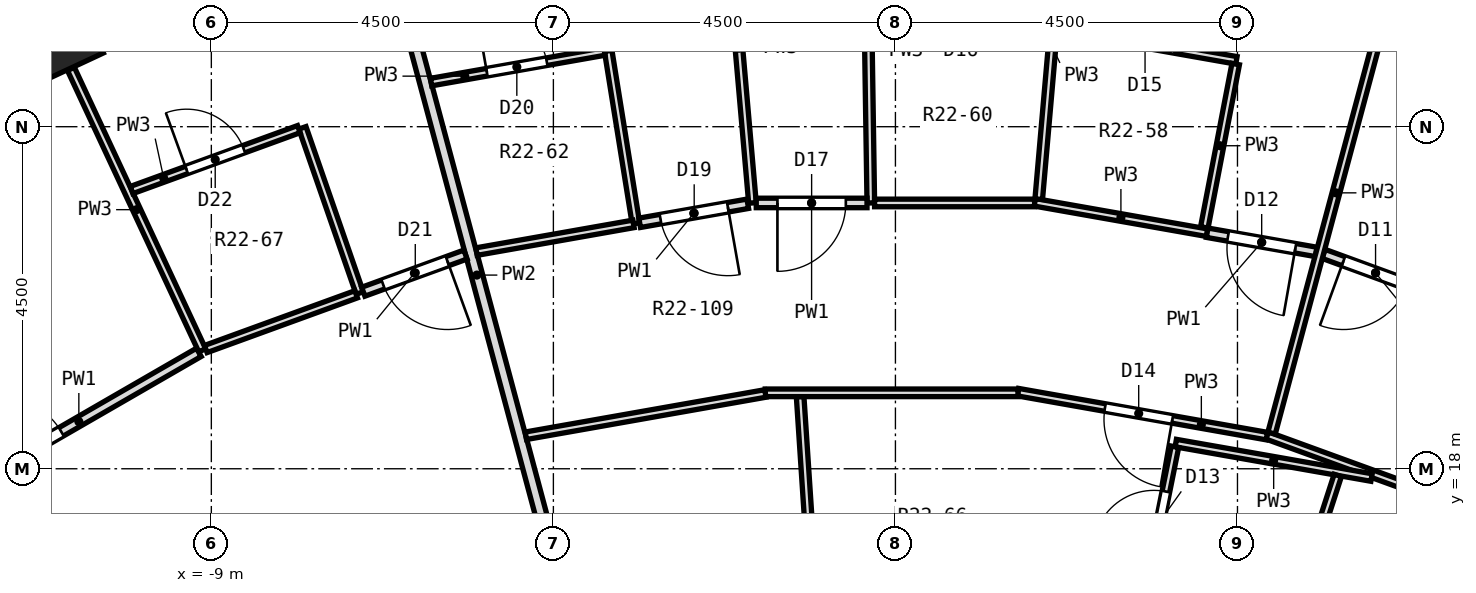
"""IFC4 building model, lengths in metres.
Left out: names, types, materials, properties, quantities, classifications, styles, units other than length and angle.
Written with IfcOpenShell. Run it as: python <this file> out.ifc"""

import sys

from ifc_helpers import new_model, si_unit, direction, frame, frame_2d, origin, origin_2d, place, context, subcontext, project, spatial, rectangle, extrude, element, fill, save


model = new_model("IFC4")
c1 = context("Model", 3, precision=1e-05, world=origin(), true_north=direction((0.0, 1.0)))
c2 = subcontext(c1, "Body", "Model", "MODEL_VIEW")
j1 = project(units=[si_unit("LENGTHUNIT", "METRE"), si_unit("PLANEANGLEUNIT", "RADIAN")], contexts=[c1])
p1 = place(None, origin())
s1 = spatial("IfcSite", under=j1, at=p1, CompositionType="ELEMENT")
p2 = place(p1, origin())
s2 = spatial("IfcBuilding", under=s1, at=p2, CompositionType="ELEMENT")
p3 = place(p2, frame((0.0, 0.0, 141.4)))
s3 = spatial("IfcBuildingStorey", under=s2, at=p3, CompositionType="ELEMENT", Elevation=141.4)
p4 = place(p3, frame((-11.052, 23.7, 0.0), z_axis=(0.0, 0.0, 1.0), x_axis=(-0.422618261741, 0.906307787037, 0.0)))
e1 = element("IfcColumn", 1, at=p4, inside=s3, PredefinedType="COLUMN", context=c2, shape_type="SweptSolid", body=[
    extrude(rectangle(XDim=0.95, YDim=0.95, at=origin_2d()), origin(), (0.0, 0.0, 1.0), 3.3),
])
p5 = place(p3, frame((-0.359, 23.797, 0.0), z_axis=(0.0, 0.0, 1.0), x_axis=(0.015177107463, -0.999884821071, 0.0)))
e2 = element("IfcWall", 2, at=p5, inside=s3, PredefinedType="PARTITIONING", context=c2, shape_type="SweptSolid", body=[
    extrude(rectangle(XDim=2.3, YDim=0.1, at=frame_2d((1.15, 0.0))), origin(), (0.0, 0.0, 1.0), 2.8),
])
p6 = place(p3, frame((-1.254, 18.949, 0.0), z_axis=(0.0, 0.0, 1.0), x_axis=(0.066059696755, -0.997815672589, 0.0)))
e3 = element("IfcWall", 3, at=p6, inside=s3, PredefinedType="PARTITIONING", context=c2, shape_type="SweptSolid", body=[
    extrude(rectangle(XDim=7.303, YDim=0.1, at=frame_2d((3.651, 0.0))), origin(), (0.0, 0.0, 1.0), 2.8),
])
p7 = place(p6, frame((3.208, 0.0, 0.0)))
e4 = element("IfcOpeningElement", 4, at=p7, cuts=e3, PredefinedType="OPENING", context=c2, shape_type="SweptSolid", body=[
    extrude(rectangle(XDim=0.9, YDim=2.1, at=frame_2d((0.45, 1.05))), frame((0.0, 0.062, 0.0), z_axis=(0.0, -1.0, 0.0), x_axis=(1.0, 0.0, 0.0)), (0.0, 0.0, 1.0), 0.124),
])
p8 = place(p3, frame((-2.237, 25.567, 0.0), z_axis=(0.0, 0.0, 1.0), x_axis=(0.087119511186, -0.996197867279, 0.0)))
e5 = element("IfcWall", 5, at=p8, inside=s3, PredefinedType="PARTITIONING", context=c2, shape_type="SweptSolid", body=[
    extrude(rectangle(XDim=4.086, YDim=0.1, at=frame_2d((2.043, 0.0))), origin(), (0.0, 0.0, 1.0), 2.8),
])
p9 = place(p3, frame((-3.779, 23.498, 0.0), z_axis=(0.0, 0.0, 1.0), x_axis=(0.15868179071, -0.987329777378, 0.0)))
e6 = element("IfcWall", 6, at=p9, inside=s3, PredefinedType="PARTITIONING", context=c2, shape_type="SweptSolid", body=[
    extrude(rectangle(XDim=2.3, YDim=0.1, at=frame_2d((1.15, 0.0))), origin(), (0.0, 0.0, 1.0), 2.8),
])
p10 = place(p3, frame((-6.643, 24.791, 0.0), z_axis=(0.0, 0.0, 1.0), x_axis=(0.258629569049, -0.965976576328, 0.0)))
e7 = element("IfcWall", 7, at=p10, inside=s3, PredefinedType="PARTITIONING", context=c2, shape_type="SweptSolid", body=[
    extrude(rectangle(XDim=8.784, YDim=0.15, at=frame_2d((4.392, 0.0))), origin(), (0.0, 0.0, 1.0), 2.8),
])
p11 = place(p3, frame((-7.802, 22.485, 0.0), z_axis=(0.0, 0.0, 1.0), x_axis=(0.327763034971, -0.944759965762, 0.0)))
e8 = element("IfcWall", 8, at=p11, inside=s3, PredefinedType="PARTITIONING", context=c2, shape_type="SweptSolid", body=[
    extrude(rectangle(XDim=2.3, YDim=0.1, at=frame_2d((1.15, 0.0))), origin(), (0.0, 0.0, 1.0), 2.8),
])
p12 = place(p3, frame((-10.847, 23.26, 0.0), z_axis=(0.0, 0.0, 1.0), x_axis=(0.422784035137, -0.906230467173, 0.0)))
e9 = element("IfcWall", 9, at=p12, inside=s3, PredefinedType="PARTITIONING", context=c2, shape_type="SweptSolid", body=[
    extrude(rectangle(XDim=4.085, YDim=0.1, at=frame_2d((2.042, 0.0))), origin(), (0.0, 0.0, 1.0), 2.8),
])
p13 = place(p3, frame((5.633, 20.827, 0.0), z_axis=(0.0, 0.0, 1.0), x_axis=(0.939292989356, -0.343116132159, 0.0)))
e10 = element("IfcWall", 10, at=p13, inside=s3, PredefinedType="PARTITIONING", context=c2, shape_type="SweptSolid", body=[
    extrude(rectangle(XDim=1.456, YDim=0.125, at=frame_2d((0.728, 0.0))), origin(), (0.0, 0.0, 1.0), 2.8),
])
p14 = place(p13, frame((0.278, 0.0, 0.0)))
e11 = element("IfcOpeningElement", 11, at=p14, cuts=e10, PredefinedType="OPENING", context=c2, shape_type="SweptSolid", body=[
    extrude(rectangle(XDim=0.9, YDim=2.1, at=frame_2d((0.45, 1.05))), frame((0.0, 0.074, 0.0), z_axis=(0.0, -1.0, 0.0), x_axis=(1.0, 0.0, 0.0)), (0.0, 0.0, 1.0), 0.149),
])
p15 = place(p3, frame((4.888, 18.438, 0.0), z_axis=(0.0, 0.0, 1.0), x_axis=(0.939679760884, -0.342055473549, 0.0)))
e12 = element("IfcWall", 12, at=p15, inside=s3, PredefinedType="PARTITIONING", context=c2, shape_type="SweptSolid", body=[
    extrude(rectangle(XDim=3.325, YDim=0.1, at=frame_2d((1.663, 0.0))), origin(), (0.0, 0.0, 1.0), 2.8),
])
p16 = place(p3, frame((3.688, 18.338, 0.0), z_axis=(0.0, 0.0, 1.0), x_axis=(0.984859586639, -0.173353957572, 0.0)))
e13 = element("IfcWall", 13, at=p16, inside=s3, PredefinedType="PARTITIONING", context=c2, shape_type="SweptSolid", body=[
    extrude(rectangle(XDim=2.615, YDim=0.1, at=frame_2d((1.308, 0.0))), origin(), (0.0, 0.0, 1.0), 2.8),
])
p17 = place(p3, frame((1.612, 19.008, 0.0), z_axis=(0.0, 0.0, 1.0), x_axis=(0.984770991222, -0.173856535243, 0.0)))
e14 = element("IfcWall", 14, at=p17, inside=s3, PredefinedType="PARTITIONING", context=c2, shape_type="SweptSolid", body=[
    extrude(rectangle(XDim=3.325, YDim=0.1, at=frame_2d((1.663, 0.0))), origin(), (0.0, 0.0, 1.0), 2.8),
])
p18 = place(p17, frame((1.163, 0.0, 0.0)))
e15 = element("IfcOpeningElement", 15, at=p18, cuts=e14, PredefinedType="OPENING", context=c2, shape_type="SweptSolid", body=[
    extrude(rectangle(XDim=0.9, YDim=2.1, at=frame_2d((0.45, 1.05))), frame((0.0, 0.062, 0.0), z_axis=(0.0, -1.0, 0.0), x_axis=(1.0, 0.0, 0.0)), (0.0, 0.0, 1.0), 0.124),
])
p19 = place(p3, frame((1.831, 21.506, 0.0), z_axis=(0.0, 0.0, 1.0), x_axis=(0.984783558818, -0.173785333909, 0.0)))
e16 = element("IfcWall", 16, at=p19, inside=s3, PredefinedType="PARTITIONING", context=c2, shape_type="SweptSolid", body=[
    extrude(rectangle(XDim=2.305, YDim=0.1, at=frame_2d((1.153, 0.0))), origin(), (0.0, 0.0, 1.0), 2.8),
])
p20 = place(p3, frame((4.101, 21.105, 0.0), z_axis=(0.0, 0.0, 1.0), x_axis=(0.984862774054, -0.173335848233, 0.0)))
e17 = element("IfcWall", 17, at=p20, inside=s3, PredefinedType="PARTITIONING", context=c2, shape_type="SweptSolid", body=[
    extrude(rectangle(XDim=1.456, YDim=0.125, at=frame_2d((0.728, 0.0))), origin(), (0.0, 0.0, 1.0), 2.8),
])
p21 = place(p20, frame((0.278, 0.0, 0.0)))
e18 = element("IfcOpeningElement", 18, at=p21, cuts=e17, PredefinedType="OPENING", context=c2, shape_type="SweptSolid", body=[
    extrude(rectangle(XDim=0.9, YDim=2.1, at=frame_2d((0.45, 1.05))), frame((0.0, 0.074, 0.0), z_axis=(0.0, -1.0, 0.0), x_axis=(1.0, 0.0, 0.0)), (0.0, 0.0, 1.0), 0.149),
])
p22 = place(p3, frame((2.131, 23.788, 0.0), z_axis=(0.0, 0.0, 1.0), x_axis=(0.984802055472, -0.173680486922, 0.0)))
e19 = element("IfcWall", 19, at=p22, inside=s3, PredefinedType="PARTITIONING", context=c2, shape_type="SweptSolid", body=[
    extrude(rectangle(XDim=2.391, YDim=0.1, at=frame_2d((1.196, 0.0))), origin(), (0.0, 0.0, 1.0), 2.8),
])
p23 = place(p22, frame((0.771, 0.0, 0.0)))
e20 = element("IfcOpeningElement", 20, at=p23, cuts=e19, PredefinedType="OPENING", context=c2, shape_type="SweptSolid", body=[
    extrude(rectangle(XDim=0.8, YDim=2.1, at=frame_2d((0.4, 1.05))), frame((0.0, 0.062, 0.0), z_axis=(0.0, -1.0, 0.0), x_axis=(1.0, 0.0, 0.0)), (0.0, 0.0, 1.0), 0.124),
])
p24 = place(p3, frame((-1.713, 18.999, 0.0), z_axis=(0.0, 0.0, 1.0), x_axis=(1.0, 0.0, 0.0)))
e21 = element("IfcWall", 21, at=p24, inside=s3, PredefinedType="PARTITIONING", context=c2, shape_type="SweptSolid", body=[
    extrude(rectangle(XDim=3.325, YDim=0.1, at=frame_2d((1.663, 0.0))), origin(), (0.0, 0.0, 1.0), 2.8),
])
p25 = place(p3, frame((-0.274, 21.497, 0.0), z_axis=(0.0, 0.0, 1.0), x_axis=(1.0, 0.0, 0.0)))
e22 = element("IfcWall", 22, at=p25, inside=s3, PredefinedType="PARTITIONING", context=c2, shape_type="SweptSolid", body=[
    extrude(rectangle(XDim=2.105, YDim=0.1, at=frame_2d((1.052, 0.0))), origin(), (0.0, 0.0, 1.0), 2.8),
])
p26 = place(p3, frame((-1.831, 21.497, 0.0), z_axis=(0.0, 0.0, 1.0), x_axis=(1.0, 0.0, 0.0)))
e23 = element("IfcWall", 23, at=p26, inside=s3, PredefinedType="PARTITIONING", context=c2, shape_type="SweptSolid", body=[
    extrude(rectangle(XDim=1.457, YDim=0.125, at=frame_2d((0.729, 0.0))), origin(), (0.0, 0.0, 1.0), 2.8),
])
p27 = place(p26, frame((0.279, 0.0, 0.0)))
e24 = element("IfcOpeningElement", 24, at=p27, cuts=e23, PredefinedType="OPENING", context=c2, shape_type="SweptSolid", body=[
    extrude(rectangle(XDim=0.9, YDim=2.1, at=frame_2d((0.45, 1.05))), frame((0.0, 0.074, 0.0), z_axis=(0.0, -1.0, 0.0), x_axis=(1.0, 0.0, 0.0)), (0.0, 0.0, 1.0), 0.149),
])
p28 = place(p3, frame((-4.862, 18.434, 0.0), z_axis=(0.0, 0.0, 1.0), x_axis=(0.984777412926, 0.173820157031, 0.0)))
e25 = element("IfcWall", 25, at=p28, inside=s3, PredefinedType="PARTITIONING", context=c2, shape_type="SweptSolid", body=[
    extrude(rectangle(XDim=3.199, YDim=0.1, at=frame_2d((1.6, 0.0))), origin(), (0.0, 0.0, 1.0), 2.8),
])
p29 = place(p3, frame((-5.511, 20.857, 0.0), z_axis=(0.0, 0.0, 1.0), x_axis=(0.984775352835, 0.173831828066, 0.0)))
e26 = element("IfcWall", 26, at=p29, inside=s3, PredefinedType="PARTITIONING", context=c2, shape_type="SweptSolid", body=[
    extrude(rectangle(XDim=2.097, YDim=0.1, at=frame_2d((1.048, 0.0))), origin(), (0.0, 0.0, 1.0), 2.8),
])
p30 = place(p3, frame((-3.365, 21.236, 0.0), z_axis=(0.0, 0.0, 1.0), x_axis=(0.984839675328, 0.173467039809, 0.0)))
e27 = element("IfcWall", 27, at=p30, inside=s3, PredefinedType="PARTITIONING", context=c2, shape_type="SweptSolid", body=[
    extrude(rectangle(XDim=1.444, YDim=0.125, at=frame_2d((0.722, 0.0))), origin(), (0.0, 0.0, 1.0), 2.8),
])
p31 = place(p30, frame((0.278, 0.0, 0.0)))
e28 = element("IfcOpeningElement", 28, at=p31, cuts=e27, PredefinedType="OPENING", context=c2, shape_type="SweptSolid", body=[
    extrude(rectangle(XDim=0.9, YDim=2.1, at=frame_2d((0.45, 1.05))), frame((0.0, 0.074, 0.0), z_axis=(0.0, -1.0, 0.0), x_axis=(1.0, 0.0, 0.0)), (0.0, 0.0, 1.0), 0.149),
])
p32 = place(p3, frame((-6.109, 23.087, 0.0), z_axis=(0.0, 0.0, 1.0), x_axis=(0.984797350308, 0.173707164006, 0.0)))
e29 = element("IfcWall", 29, at=p32, inside=s3, PredefinedType="PARTITIONING", context=c2, shape_type="SweptSolid", body=[
    extrude(rectangle(XDim=2.316, YDim=0.1, at=frame_2d((1.158, 0.0))), origin(), (0.0, 0.0, 1.0), 2.8),
])
p33 = place(p32, frame((0.746, 0.0, 0.0)))
e30 = element("IfcOpeningElement", 30, at=p33, cuts=e29, PredefinedType="OPENING", context=c2, shape_type="SweptSolid", body=[
    extrude(rectangle(XDim=0.8, YDim=2.1, at=frame_2d((0.4, 1.05))), frame((0.0, 0.062, 0.0), z_axis=(0.0, -1.0, 0.0), x_axis=(1.0, 0.0, 0.0)), (0.0, 0.0, 1.0), 0.124),
])
p34 = place(p3, frame((-9.073, 19.575, 0.0), z_axis=(0.0, 0.0, 1.0), x_axis=(0.939725675468, 0.341929312674, 0.0)))
e31 = element("IfcWall", 31, at=p34, inside=s3, PredefinedType="PARTITIONING", context=c2, shape_type="SweptSolid", body=[
    extrude(rectangle(XDim=2.105, YDim=0.1, at=frame_2d((1.052, 0.0))), origin(), (0.0, 0.0, 1.0), 2.8),
])
p35 = place(p3, frame((-7.001, 20.329, 0.0), z_axis=(0.0, 0.0, 1.0), x_axis=(0.939788441711, 0.341756762663, 0.0)))
e32 = element("IfcWall", 32, at=p35, inside=s3, PredefinedType="PARTITIONING", context=c2, shape_type="SweptSolid", body=[
    extrude(rectangle(XDim=1.431, YDim=0.125, at=frame_2d((0.715, 0.0))), origin(), (0.0, 0.0, 1.0), 2.8),
])
p36 = place(p35, frame((0.278, 0.0, 0.0)))
e33 = element("IfcOpeningElement", 33, at=p36, cuts=e32, PredefinedType="OPENING", context=c2, shape_type="SweptSolid", body=[
    extrude(rectangle(XDim=0.9, YDim=2.1, at=frame_2d((0.45, 1.05))), frame((0.0, 0.074, 0.0), z_axis=(0.0, -1.0, 0.0), x_axis=(1.0, 0.0, 0.0)), (0.0, 0.0, 1.0), 0.149),
])
p37 = place(p3, frame((-10.049, 21.667, 0.0), z_axis=(0.0, 0.0, 1.0), x_axis=(0.939662448837, 0.342103028699, 0.0)))
e34 = element("IfcWall", 34, at=p37, inside=s3, PredefinedType="PARTITIONING", context=c2, shape_type="SweptSolid", body=[
    extrude(rectangle(XDim=2.342, YDim=0.1, at=frame_2d((1.171, 0.0))), origin(), (0.0, 0.0, 1.0), 2.8),
])
p38 = place(p37, frame((0.771, 0.0, 0.0)))
e35 = element("IfcOpeningElement", 35, at=p38, cuts=e34, PredefinedType="OPENING", context=c2, shape_type="SweptSolid", body=[
    extrude(rectangle(XDim=0.8, YDim=2.1, at=frame_2d((0.4, 1.05))), frame((0.0, 0.062, 0.0), z_axis=(0.0, -1.0, 0.0), x_axis=(1.0, 0.0, 0.0)), (0.0, 0.0, 1.0), 0.124),
])
p39 = place(p3, frame((-12.432, 17.645, 0.0), z_axis=(0.0, 0.0, 1.0), x_axis=(0.866012062527, 0.500023107024, 0.0)))
e36 = element("IfcWall", 36, at=p39, inside=s3, PredefinedType="PARTITIONING", context=c2, shape_type="SweptSolid", body=[
    extrude(rectangle(XDim=3.772, YDim=0.125, at=frame_2d((1.886, 0.0))), origin(), (0.0, 0.0, 1.0), 2.8),
])
p40 = place(p39, frame((0.783, 0.0, 0.0)))
e37 = element("IfcOpeningElement", 37, at=p40, cuts=e36, PredefinedType="OPENING", context=c2, shape_type="SweptSolid", body=[
    extrude(rectangle(XDim=0.9, YDim=2.1, at=frame_2d((0.45, 1.05))), frame((0.0, 0.074, 0.0), z_axis=(0.0, -1.0, 0.0), x_axis=(1.0, 0.0, 0.0)), (0.0, 0.0, 1.0), 0.149),
])
p41 = place(p3, frame((5.072, 15.609, 0.0), z_axis=(0.0, 0.0, 1.0), x_axis=(0.30874872516, 0.95114364042, 0.0)))
e38 = element("IfcWall", 38, at=p41, inside=s3, PredefinedType="PARTITIONING", context=c2, shape_type="SweptSolid", body=[
    extrude(rectangle(XDim=2.422, YDim=0.1, at=frame_2d((1.211, 0.0))), origin(), (0.0, 0.0, 1.0), 2.8),
])
p42 = place(p3, frame((4.949, 18.469, 0.0), z_axis=(0.0, 0.0, 1.0), x_axis=(0.258793270627, 0.96593273217, 0.0)))
e39 = element("IfcWall", 39, at=p42, inside=s3, PredefinedType="PARTITIONING", context=c2, shape_type="SweptSolid", body=[
    extrude(rectangle(XDim=6.544, YDim=0.1, at=frame_2d((3.272, 0.0))), origin(), (0.0, 0.0, 1.0), 2.8),
])
p43 = place(p3, frame((3.285, 16.34, 0.0), z_axis=(0.0, 0.0, 1.0), x_axis=(0.197131685641, 0.980377018558, 0.0)))
e40 = element("IfcWall", 40, at=p43, inside=s3, PredefinedType="PARTITIONING", context=c2, shape_type="SweptSolid", body=[
    extrude(rectangle(XDim=1.988, YDim=0.1, at=frame_2d((0.994, 0.0))), origin(), (0.0, 0.0, 1.0), 2.8),
])
p44 = place(p43, frame((0.587, 0.0, 0.0)))
e41 = element("IfcOpeningElement", 41, at=p44, cuts=e40, PredefinedType="OPENING", context=c2, shape_type="SweptSolid", body=[
    extrude(rectangle(XDim=0.8, YDim=2.1, at=frame_2d((0.4, 1.05))), frame((0.0, 0.062, 0.0), z_axis=(0.0, -1.0, 0.0), x_axis=(1.0, 0.0, 0.0)), (0.0, 0.0, 1.0), 0.124),
])
p45 = place(p3, frame((4.064, 21.175, 0.0), z_axis=(0.0, 0.0, 1.0), x_axis=(0.188685986474, 0.982037473067, 0.0)))
e42 = element("IfcWall", 42, at=p45, inside=s3, PredefinedType="PARTITIONING", context=c2, shape_type="SweptSolid", body=[
    extrude(rectangle(XDim=2.188, YDim=0.1, at=frame_2d((1.094, 0.0))), origin(), (0.0, 0.0, 1.0), 2.8),
])
p46 = place(p3, frame((1.885, 21.547, 0.0), z_axis=(0.0, 0.0, 1.0), x_axis=(0.087109918438, 0.996198706137, 0.0)))
e43 = element("IfcWall", 43, at=p46, inside=s3, PredefinedType="PARTITIONING", context=c2, shape_type="SweptSolid", body=[
    extrude(rectangle(XDim=4.036, YDim=0.1, at=frame_2d((2.018, 0.0))), origin(), (0.0, 0.0, 1.0), 2.8),
])
p47 = place(p14, frame((0.9, 0.0, 0.0), z_axis=(0.0, 0.0, 1.0), x_axis=(-1.0, 0.0, 0.0)))
e44 = element("IfcDoor", 44, at=p47, inside=s3, OperationType="SINGLE_SWING_RIGHT", PredefinedType="DOOR", context=c2, shape_type="SweptSolid", body=[
    extrude(rectangle(XDim=0.9, YDim=2.1, at=frame_2d((0.45, 1.05))), frame((0.0, 0.025, 0.0), z_axis=(0.0, -1.0, 0.0), x_axis=(1.0, 0.0, 0.0)), (0.0, 0.0, 1.0), 0.05),
])
fill(e11, e44)
p48 = place(p21, frame((0.9, 0.0, 0.0), z_axis=(0.0, 0.0, 1.0), x_axis=(-1.0, 0.0, 0.0)))
e45 = element("IfcDoor", 45, at=p48, inside=s3, OperationType="SINGLE_SWING_LEFT", PredefinedType="DOOR", context=c2, shape_type="SweptSolid", body=[
    extrude(rectangle(XDim=0.9, YDim=2.1, at=frame_2d((0.45, 1.05))), frame((0.0, 0.025, 0.0), z_axis=(0.0, -1.0, 0.0), x_axis=(1.0, 0.0, 0.0)), (0.0, 0.0, 1.0), 0.05),
])
fill(e18, e45)
p49 = place(p44, origin())
e46 = element("IfcDoor", 46, at=p49, inside=s3, OperationType="SINGLE_SWING_LEFT", PredefinedType="DOOR", context=c2, shape_type="SweptSolid", body=[
    extrude(rectangle(XDim=0.8, YDim=2.1, at=frame_2d((0.4, 1.05))), frame((0.0, 0.025, 0.0), z_axis=(0.0, -1.0, 0.0), x_axis=(1.0, 0.0, 0.0)), (0.0, 0.0, 1.0), 0.05),
])
fill(e41, e46)
p50 = place(p18, frame((0.9, 0.0, 0.0), z_axis=(0.0, 0.0, 1.0), x_axis=(-1.0, 0.0, 0.0)))
e47 = element("IfcDoor", 47, at=p50, inside=s3, OperationType="SINGLE_SWING_LEFT", PredefinedType="DOOR", context=c2, shape_type="SweptSolid", body=[
    extrude(rectangle(XDim=0.9, YDim=2.1, at=frame_2d((0.45, 1.05))), frame((0.0, 0.025, 0.0), z_axis=(0.0, -1.0, 0.0), x_axis=(1.0, 0.0, 0.0)), (0.0, 0.0, 1.0), 0.05),
])
fill(e15, e47)
p51 = place(p27, frame((0.9, 0.0, 0.0), z_axis=(0.0, 0.0, 1.0), x_axis=(-1.0, 0.0, 0.0)))
e48 = element("IfcDoor", 48, at=p51, inside=s3, OperationType="SINGLE_SWING_RIGHT", PredefinedType="DOOR", context=c2, shape_type="SweptSolid", body=[
    extrude(rectangle(XDim=0.9, YDim=2.1, at=frame_2d((0.45, 1.05))), frame((0.0, 0.025, 0.0), z_axis=(0.0, -1.0, 0.0), x_axis=(1.0, 0.0, 0.0)), (0.0, 0.0, 1.0), 0.05),
])
fill(e24, e48)
p52 = place(p31, frame((0.9, 0.0, 0.0), z_axis=(0.0, 0.0, 1.0), x_axis=(-1.0, 0.0, 0.0)))
e49 = element("IfcDoor", 49, at=p52, inside=s3, OperationType="SINGLE_SWING_LEFT", PredefinedType="DOOR", context=c2, shape_type="SweptSolid", body=[
    extrude(rectangle(XDim=0.9, YDim=2.1, at=frame_2d((0.45, 1.05))), frame((0.0, 0.025, 0.0), z_axis=(0.0, -1.0, 0.0), x_axis=(1.0, 0.0, 0.0)), (0.0, 0.0, 1.0), 0.05),
])
fill(e28, e49)
p53 = place(p33, origin())
e50 = element("IfcDoor", 50, at=p53, inside=s3, OperationType="SINGLE_SWING_LEFT", PredefinedType="DOOR", context=c2, shape_type="SweptSolid", body=[
    extrude(rectangle(XDim=0.8, YDim=2.1, at=frame_2d((0.4, 1.05))), frame((0.0, 0.025, 0.0), z_axis=(0.0, -1.0, 0.0), x_axis=(1.0, 0.0, 0.0)), (0.0, 0.0, 1.0), 0.05),
])
fill(e30, e50)
p54 = place(p36, frame((0.9, 0.0, 0.0), z_axis=(0.0, 0.0, 1.0), x_axis=(-1.0, 0.0, 0.0)))
e51 = element("IfcDoor", 51, at=p54, inside=s3, OperationType="SINGLE_SWING_LEFT", PredefinedType="DOOR", context=c2, shape_type="SweptSolid", body=[
    extrude(rectangle(XDim=0.9, YDim=2.1, at=frame_2d((0.45, 1.05))), frame((0.0, 0.025, 0.0), z_axis=(0.0, -1.0, 0.0), x_axis=(1.0, 0.0, 0.0)), (0.0, 0.0, 1.0), 0.05),
])
fill(e33, e51)
p55 = place(p38, origin())
e52 = element("IfcDoor", 52, at=p55, inside=s3, OperationType="SINGLE_SWING_LEFT", PredefinedType="DOOR", context=c2, shape_type="SweptSolid", body=[
    extrude(rectangle(XDim=0.8, YDim=2.1, at=frame_2d((0.4, 1.05))), frame((0.0, 0.025, 0.0), z_axis=(0.0, -1.0, 0.0), x_axis=(1.0, 0.0, 0.0)), (0.0, 0.0, 1.0), 0.05),
])
fill(e35, e52)
p56 = place(p40, origin())
e53 = element("IfcDoor", 53, at=p56, inside=s3, OperationType="SINGLE_SWING_LEFT", PredefinedType="DOOR", context=c2, shape_type="SweptSolid", body=[
    extrude(rectangle(XDim=0.9, YDim=2.1, at=frame_2d((0.45, 1.05))), frame((0.0, 0.025, 0.0), z_axis=(0.0, -1.0, 0.0), x_axis=(1.0, 0.0, 0.0)), (0.0, 0.0, 1.0), 0.05),
])
fill(e37, e53)
save(model, sys.argv[1])
